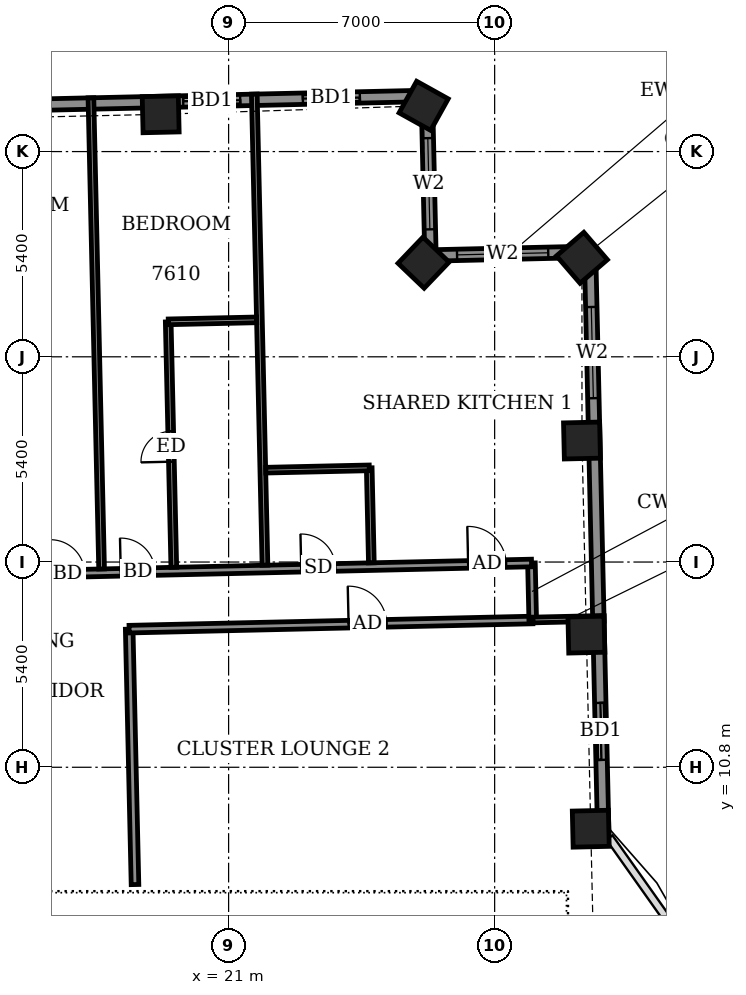
"""IFC4 building model, lengths in metres.
Left out: names, types, materials, properties, quantities, classifications, styles, units other than length and angle.
Written with IfcOpenShell. Run it as: python <this file> out.ifc"""

import sys

from ifc_helpers import new_model, si_unit, direction, frame, frame_2d, origin, origin_2d, place, context, subcontext, project, spatial, rectangle, extrude, element, fill, save


model = new_model("IFC4")
c1 = context("Model", 3, precision=1e-05, world=origin(), true_north=direction((0.0, 1.0)))
c2 = subcontext(c1, "Body", "Model", "MODEL_VIEW")
j1 = project(units=[si_unit("LENGTHUNIT", "METRE"), si_unit("PLANEANGLEUNIT", "RADIAN")], contexts=[c1])
p1 = place(None, origin())
s1 = spatial("IfcSite", under=j1, at=p1, CompositionType="ELEMENT")
p2 = place(p1, origin())
s2 = spatial("IfcBuilding", under=s1, at=p2, CompositionType="ELEMENT")
p3 = place(p2, frame((0.0, 0.0, 297.9)))
s3 = spatial("IfcBuildingStorey", under=s2, at=p3, CompositionType="ELEMENT", Elevation=297.9)
for number, where, z_axis, x_axis in (
    (1, (30.529, 9.183, -0.55), (0.0, 0.0, 1.0), (-0.023, 1.0, 0.0)),
    (2, (30.414, 14.29, -0.55), (0.0, 0.0, 1.0), (-0.023, 1.0, 0.0)),
    (3, (30.298, 19.397, -0.55), (0.0, 0.0, 1.0), (-0.023, 1.0, 0.0)),
    (4, (30.297, 24.205, -0.55), (0.0, 0.0, 1.0), (-0.652, 0.758, 0.0)),
    (5, (26.13, 24.077, -0.55), (0.0, 0.0, 1.0), (-0.723, 0.691, 0.0)),
    (6, (26.132, 28.204, -0.55), (0.0, 0.0, 1.0), (-0.874, 0.486, 0.0)),
    (7, (19.213, 27.981, -0.55), (0.0, 0.0, 1.0), (-1.0, -0.023, 0.0)),
):
    element("IfcColumn", number, at=place(p3, frame(where, z_axis=z_axis, x_axis=x_axis)), inside=s3, PredefinedType="COLUMN", context=c2, shape_type="SweptSolid", body=[
        extrude(rectangle(XDim=0.95, YDim=0.95, at=origin_2d()), origin(), (0.0, 0.0, 1.0), 3.6),
    ])
p4 = place(p3, frame((30.858, 9.032, 0.0), z_axis=(0.0, 0.0, 1.0), x_axis=(-0.022688132126, 0.999742591201, 0.0)))
e8 = element("IfcWall", 8, at=p4, inside=s3, PredefinedType="SOLIDWALL", context=c2, shape_type="SweptSolid", body=[
    extrude(rectangle(XDim=15.334, YDim=0.3, at=frame_2d((7.667, 0.0))), origin(), (0.0, 0.0, 1.0), 2.55),
])
p5 = place(p4, frame((1.963, 0.0, 0.0)))
e9 = element("IfcOpeningElement", 9, at=p5, cuts=e8, PredefinedType="OPENING", context=c2, shape_type="SweptSolid", body=[
    extrude(rectangle(XDim=1.5, YDim=2.4, at=frame_2d((0.75, 1.2))), frame((0.0, 0.16, 0.0), z_axis=(0.0, -1.0, 0.0), x_axis=(1.0, 0.0, 0.0)), (0.0, 0.0, 1.0), 0.32),
])
p6 = place(p4, frame((11.482, 0.0, 0.9)))
e10 = element("IfcOpeningElement", 10, at=p6, cuts=e8, PredefinedType="OPENING", context=c2, shape_type="SweptSolid", body=[
    extrude(rectangle(XDim=2.4, YDim=1.5, at=frame_2d((1.2, 0.75))), frame((0.0, 0.16, 0.0), z_axis=(0.0, -1.0, 0.0), x_axis=(1.0, 0.0, 0.0)), (0.0, 0.0, 1.0), 0.32),
])
p7 = place(p3, frame((30.51, 24.362, 0.0), z_axis=(0.0, 0.0, 1.0), x_axis=(-0.999739037152, -0.022844202663, 0.0)))
e11 = element("IfcWall", 11, at=p7, inside=s3, PredefinedType="SOLIDWALL", context=c2, shape_type="SweptSolid", body=[
    extrude(rectangle(XDim=4.2, YDim=0.3, at=frame_2d((2.1, 0.0))), origin(), (0.0, 0.0, 1.0), 2.55),
])
p8 = place(p7, frame((1.1, 0.0, 0.9)))
e12 = element("IfcOpeningElement", 12, at=p8, cuts=e11, PredefinedType="OPENING", context=c2, shape_type="SweptSolid", body=[
    extrude(rectangle(XDim=2.4, YDim=1.5, at=frame_2d((1.2, 0.75))), frame((0.0, 0.16, 0.0), z_axis=(0.0, -1.0, 0.0), x_axis=(1.0, 0.0, 0.0)), (0.0, 0.0, 1.0), 0.32),
])
p9 = place(p3, frame((26.311, 24.266, 0.0), z_axis=(0.0, 0.0, 1.0), x_axis=(-0.022611811187, 0.999744320311, 0.0)))
e13 = element("IfcWall", 13, at=p9, inside=s3, PredefinedType="SOLIDWALL", context=c2, shape_type="SweptSolid", body=[
    extrude(rectangle(XDim=4.2, YDim=0.3, at=frame_2d((2.1, 0.0))), origin(), (0.0, 0.0, 1.0), 2.55),
])
p10 = place(p9, frame((0.688, 0.0, 0.9)))
e14 = element("IfcOpeningElement", 14, at=p10, cuts=e13, PredefinedType="OPENING", context=c2, shape_type="SweptSolid", body=[
    extrude(rectangle(XDim=2.4, YDim=1.5, at=frame_2d((1.2, 0.75))), frame((0.0, 0.16, 0.0), z_axis=(0.0, -1.0, 0.0), x_axis=(1.0, 0.0, 0.0)), (0.0, 0.0, 1.0), 0.32),
])
p11 = place(p3, frame((26.216, 28.465, 0.0), z_axis=(0.0, 0.0, 1.0), x_axis=(-0.999742843677, -0.022677004157, 0.0)))
e15 = element("IfcWall", 15, at=p11, inside=s3, PredefinedType="SOLIDWALL", context=c2, shape_type="SweptSolid", body=[
    extrude(rectangle(XDim=49.836, YDim=0.3, at=frame_2d((24.918, 0.0))), origin(), (0.0, 0.0, 1.0), 2.5),
])
p12 = place(p11, frame((1.763, 0.0, 0.0)))
e16 = element("IfcOpeningElement", 16, at=p12, cuts=e15, PredefinedType="OPENING", context=c2, shape_type="SweptSolid", body=[
    extrude(rectangle(XDim=1.5, YDim=2.4, at=frame_2d((0.75, 1.2))), frame((0.0, 0.16, 0.0), z_axis=(0.0, -1.0, 0.0), x_axis=(1.0, 0.0, 0.0)), (0.0, 0.0, 1.0), 0.32),
])
p13 = place(p11, frame((4.912, 0.0, 0.0)))
e17 = element("IfcOpeningElement", 17, at=p13, cuts=e15, PredefinedType="OPENING", context=c2, shape_type="SweptSolid", body=[
    extrude(rectangle(XDim=1.5, YDim=2.4, at=frame_2d((0.75, 1.2))), frame((0.0, 0.16, 0.0), z_axis=(0.0, -1.0, 0.0), x_axis=(1.0, 0.0, 0.0)), (0.0, 0.0, 1.0), 0.32),
])
p14 = place(p11, frame((10.186, 0.0, 0.0)))
e18 = element("IfcOpeningElement", 18, at=p14, cuts=e15, PredefinedType="OPENING", context=c2, shape_type="SweptSolid", body=[
    extrude(rectangle(XDim=1.5, YDim=2.4, at=frame_2d((0.75, 1.2))), frame((0.0, 0.16, 0.0), z_axis=(0.0, -1.0, 0.0), x_axis=(1.0, 0.0, 0.0)), (0.0, 0.0, 1.0), 0.32),
])
p15 = place(p11, frame((15.093, 0.0, 0.0)))
e19 = element("IfcOpeningElement", 19, at=p15, cuts=e15, PredefinedType="OPENING", context=c2, shape_type="SweptSolid", body=[
    extrude(rectangle(XDim=1.5, YDim=2.4, at=frame_2d((0.75, 1.2))), frame((0.0, 0.16, 0.0), z_axis=(0.0, -1.0, 0.0), x_axis=(1.0, 0.0, 0.0)), (0.0, 0.0, 1.0), 0.32),
])
p16 = place(p11, frame((18.449, 0.0, 0.0)))
e20 = element("IfcOpeningElement", 20, at=p16, cuts=e15, PredefinedType="OPENING", context=c2, shape_type="SweptSolid", body=[
    extrude(rectangle(XDim=1.5, YDim=2.4, at=frame_2d((0.75, 1.2))), frame((0.0, 0.16, 0.0), z_axis=(0.0, -1.0, 0.0), x_axis=(1.0, 0.0, 0.0)), (0.0, 0.0, 1.0), 0.32),
])
p17 = place(p11, frame((22.924, 0.0, 0.0)))
e21 = element("IfcOpeningElement", 21, at=p17, cuts=e15, PredefinedType="OPENING", context=c2, shape_type="SweptSolid", body=[
    extrude(rectangle(XDim=1.5, YDim=2.4, at=frame_2d((0.75, 1.2))), frame((0.0, 0.16, 0.0), z_axis=(0.0, -1.0, 0.0), x_axis=(1.0, 0.0, 0.0)), (0.0, 0.0, 1.0), 0.32),
])
p18 = place(p11, frame((26.28, 0.0, 0.0)))
e22 = element("IfcOpeningElement", 22, at=p18, cuts=e15, PredefinedType="OPENING", context=c2, shape_type="SweptSolid", body=[
    extrude(rectangle(XDim=1.5, YDim=2.4, at=frame_2d((0.75, 1.2))), frame((0.0, 0.16, 0.0), z_axis=(0.0, -1.0, 0.0), x_axis=(1.0, 0.0, 0.0)), (0.0, 0.0, 1.0), 0.32),
])
p19 = place(p11, frame((31.361, 0.0, 0.0)))
e23 = element("IfcOpeningElement", 23, at=p19, cuts=e15, PredefinedType="OPENING", context=c2, shape_type="SweptSolid", body=[
    extrude(rectangle(XDim=1.5, YDim=2.4, at=frame_2d((0.75, 1.2))), frame((0.0, 0.16, 0.0), z_axis=(0.0, -1.0, 0.0), x_axis=(1.0, 0.0, 0.0)), (0.0, 0.0, 1.0), 0.32),
])
p20 = place(p11, frame((36.437, 0.0, 0.0)))
e24 = element("IfcOpeningElement", 24, at=p20, cuts=e15, PredefinedType="OPENING", context=c2, shape_type="SweptSolid", body=[
    extrude(rectangle(XDim=1.5, YDim=2.4, at=frame_2d((0.75, 1.2))), frame((0.0, 0.16, 0.0), z_axis=(0.0, -1.0, 0.0), x_axis=(1.0, 0.0, 0.0)), (0.0, 0.0, 1.0), 0.32),
])
p21 = place(p11, frame((39.793, 0.0, 0.0)))
e25 = element("IfcOpeningElement", 25, at=p21, cuts=e15, PredefinedType="OPENING", context=c2, shape_type="SweptSolid", body=[
    extrude(rectangle(XDim=1.5, YDim=2.4, at=frame_2d((0.75, 1.2))), frame((0.0, 0.16, 0.0), z_axis=(0.0, -1.0, 0.0), x_axis=(1.0, 0.0, 0.0)), (0.0, 0.0, 1.0), 0.32),
])
p22 = place(p11, frame((44.267, 0.0, 0.0)))
e26 = element("IfcOpeningElement", 26, at=p22, cuts=e15, PredefinedType="OPENING", context=c2, shape_type="SweptSolid", body=[
    extrude(rectangle(XDim=1.5, YDim=2.4, at=frame_2d((0.75, 1.2))), frame((0.0, 0.16, 0.0), z_axis=(0.0, -1.0, 0.0), x_axis=(1.0, 0.0, 0.0)), (0.0, 0.0, 1.0), 0.32),
])
p23 = place(p11, frame((47.524, 0.0, 0.9)))
e27 = element("IfcOpeningElement", 27, at=p23, cuts=e15, PredefinedType="OPENING", context=c2, shape_type="SweptSolid", body=[
    extrude(rectangle(XDim=1.2, YDim=1.5, at=frame_2d((0.6, 0.75))), frame((0.0, 0.16, 0.0), z_axis=(0.0, -1.0, 0.0), x_axis=(1.0, 0.0, 0.0)), (0.0, 0.0, 1.0), 0.32),
])
p24 = place(p3, frame((18.537, 7.714, 0.0), z_axis=(0.0, 0.0, 1.0), x_axis=(-0.022773383809, 0.999740652864, 0.0)))
e28 = element("IfcWall", 28, at=p24, inside=s3, PredefinedType="PARTITIONING", context=c2, shape_type="SweptSolid", body=[
    extrude(rectangle(XDim=6.722, YDim=0.2, at=frame_2d((3.361, 0.0))), origin(), (0.0, 0.0, 1.0), 3.05),
])
p25 = place(p3, frame((18.382, 14.434, 0.0), z_axis=(0.0, 0.0, 1.0), x_axis=(0.999742819156, 0.02267808514, 0.0)))
e29 = element("IfcWall", 29, at=p25, inside=s3, PredefinedType="PARTITIONING", context=c2, shape_type="SweptSolid", body=[
    extrude(rectangle(XDim=10.625, YDim=0.2, at=frame_2d((5.313, 0.0))), origin(), (0.0, 0.0, 1.0), 3.05),
])
p26 = place(p25, frame((5.777, 0.0, 0.0)))
e30 = element("IfcOpeningElement", 30, at=p26, cuts=e29, PredefinedType="OPENING", context=c2, shape_type="SweptSolid", body=[
    extrude(rectangle(XDim=1.0, YDim=2.1, at=frame_2d((0.5, 1.05))), frame((0.0, 0.11, 0.0), z_axis=(0.0, -1.0, 0.0), x_axis=(1.0, 0.0, 0.0)), (0.0, 0.0, 1.0), 0.22),
])
p27 = place(p3, frame((29.002, 14.675, 0.0), z_axis=(0.0, 0.0, 1.0), x_axis=(-0.022617910375, 0.999744182344, 0.0)))
e31 = element("IfcWall", 31, at=p27, inside=s3, PredefinedType="PARTITIONING", context=c2, shape_type="SweptSolid", body=[
    extrude(rectangle(XDim=1.5, YDim=0.2, at=frame_2d((0.75, 0.0))), origin(), (0.0, 0.0, 1.0), 3.05),
])
p28 = place(p3, frame((29.005, 14.675, 0.0), z_axis=(0.0, 0.0, 1.0), x_axis=(0.999737243051, 0.022922583999, 0.0)))
e32 = element("IfcWall", 32, at=p28, inside=s3, PredefinedType="PARTITIONING", context=c2, shape_type="SweptSolid", body=[
    extrude(rectangle(XDim=1.875, YDim=0.15, at=frame_2d((0.937, 0.0))), origin(), (0.0, 0.0, 1.0), 2.55),
])
p29 = place(p3, frame((-26.401, 14.918, 0.0), z_axis=(0.0, 0.0, 1.0), x_axis=(0.99974239733, 0.022696673341, 0.0)))
e33 = element("IfcWall", 33, at=p29, inside=s3, PredefinedType="PARTITIONING", context=c2, shape_type="SweptSolid", body=[
    extrude(rectangle(XDim=55.386, YDim=0.2, at=frame_2d((27.693, 0.0))), origin(), (0.0, 0.0, 1.0), 3.05),
])
p30 = place(p29, frame((53.718, 0.0, 0.0)))
e34 = element("IfcOpeningElement", 34, at=p30, cuts=e33, PredefinedType="OPENING", context=c2, shape_type="SweptSolid", body=[
    extrude(rectangle(XDim=1.0, YDim=2.1, at=frame_2d((0.5, 1.05))), frame((0.0, 0.11, 0.0), z_axis=(0.0, -1.0, 0.0), x_axis=(1.0, 0.0, 0.0)), (0.0, 0.0, 1.0), 0.22),
])
p31 = place(p29, frame((49.325, 0.0, 0.0)))
e35 = element("IfcOpeningElement", 35, at=p31, cuts=e33, PredefinedType="OPENING", context=c2, shape_type="SweptSolid", body=[
    extrude(rectangle(XDim=0.9, YDim=2.1, at=frame_2d((0.45, 1.05))), frame((0.0, 0.11, 0.0), z_axis=(0.0, -1.0, 0.0), x_axis=(1.0, 0.0, 0.0)), (0.0, 0.0, 1.0), 0.22),
])
p32 = place(p29, frame((44.575, 0.0, 0.0)))
e36 = element("IfcOpeningElement", 36, at=p32, cuts=e33, PredefinedType="OPENING", context=c2, shape_type="SweptSolid", body=[
    extrude(rectangle(XDim=0.9, YDim=2.1, at=frame_2d((0.45, 1.05))), frame((0.0, 0.11, 0.0), z_axis=(0.0, -1.0, 0.0), x_axis=(1.0, 0.0, 0.0)), (0.0, 0.0, 1.0), 0.22),
])
p33 = place(p29, frame((42.725, 0.0, 0.0)))
e37 = element("IfcOpeningElement", 37, at=p33, cuts=e33, PredefinedType="OPENING", context=c2, shape_type="SweptSolid", body=[
    extrude(rectangle(XDim=0.9, YDim=2.1, at=frame_2d((0.45, 1.05))), frame((0.0, 0.11, 0.0), z_axis=(0.0, -1.0, 0.0), x_axis=(1.0, 0.0, 0.0)), (0.0, 0.0, 1.0), 0.22),
])
p34 = place(p29, frame((36.1, 0.0, 0.0)))
e38 = element("IfcOpeningElement", 38, at=p34, cuts=e33, PredefinedType="OPENING", context=c2, shape_type="SweptSolid", body=[
    extrude(rectangle(XDim=0.9, YDim=2.1, at=frame_2d((0.45, 1.05))), frame((0.0, 0.11, 0.0), z_axis=(0.0, -1.0, 0.0), x_axis=(1.0, 0.0, 0.0)), (0.0, 0.0, 1.0), 0.22),
])
p35 = place(p29, frame((34.25, 0.0, 0.0)))
e39 = element("IfcOpeningElement", 39, at=p35, cuts=e33, PredefinedType="OPENING", context=c2, shape_type="SweptSolid", body=[
    extrude(rectangle(XDim=0.9, YDim=2.1, at=frame_2d((0.45, 1.05))), frame((0.0, 0.11, 0.0), z_axis=(0.0, -1.0, 0.0), x_axis=(1.0, 0.0, 0.0)), (0.0, 0.0, 1.0), 0.22),
])
p36 = place(p29, frame((27.6, 0.0, 0.0)))
e40 = element("IfcOpeningElement", 40, at=p36, cuts=e33, PredefinedType="OPENING", context=c2, shape_type="SweptSolid", body=[
    extrude(rectangle(XDim=0.9, YDim=2.1, at=frame_2d((0.45, 1.05))), frame((0.0, 0.11, 0.0), z_axis=(0.0, -1.0, 0.0), x_axis=(1.0, 0.0, 0.0)), (0.0, 0.0, 1.0), 0.22),
])
p37 = place(p29, frame((25.775, 0.0, 0.0)))
e41 = element("IfcOpeningElement", 41, at=p37, cuts=e33, PredefinedType="OPENING", context=c2, shape_type="SweptSolid", body=[
    extrude(rectangle(XDim=0.9, YDim=2.1, at=frame_2d((0.45, 1.05))), frame((0.0, 0.11, 0.0), z_axis=(0.0, -1.0, 0.0), x_axis=(1.0, 0.0, 0.0)), (0.0, 0.0, 1.0), 0.22),
])
p38 = place(p29, frame((19.15, 0.0, 0.0)))
e42 = element("IfcOpeningElement", 42, at=p38, cuts=e33, PredefinedType="OPENING", context=c2, shape_type="SweptSolid", body=[
    extrude(rectangle(XDim=0.9, YDim=2.1, at=frame_2d((0.45, 1.05))), frame((0.0, 0.11, 0.0), z_axis=(0.0, -1.0, 0.0), x_axis=(1.0, 0.0, 0.0)), (0.0, 0.0, 1.0), 0.22),
])
p39 = place(p29, frame((17.3, 0.0, 0.0)))
e43 = element("IfcOpeningElement", 43, at=p39, cuts=e33, PredefinedType="OPENING", context=c2, shape_type="SweptSolid", body=[
    extrude(rectangle(XDim=0.9, YDim=2.1, at=frame_2d((0.45, 1.05))), frame((0.0, 0.11, 0.0), z_axis=(0.0, -1.0, 0.0), x_axis=(1.0, 0.0, 0.0)), (0.0, 0.0, 1.0), 0.22),
])
p40 = place(p29, frame((10.65, 0.0, 0.0)))
e44 = element("IfcOpeningElement", 44, at=p40, cuts=e33, PredefinedType="OPENING", context=c2, shape_type="SweptSolid", body=[
    extrude(rectangle(XDim=0.9, YDim=2.1, at=frame_2d((0.45, 1.05))), frame((0.0, 0.11, 0.0), z_axis=(0.0, -1.0, 0.0), x_axis=(1.0, 0.0, 0.0)), (0.0, 0.0, 1.0), 0.22),
])
p41 = place(p29, frame((8.8, 0.0, 0.0)))
e45 = element("IfcOpeningElement", 45, at=p41, cuts=e33, PredefinedType="OPENING", context=c2, shape_type="SweptSolid", body=[
    extrude(rectangle(XDim=0.9, YDim=2.1, at=frame_2d((0.45, 1.05))), frame((0.0, 0.11, 0.0), z_axis=(0.0, -1.0, 0.0), x_axis=(1.0, 0.0, 0.0)), (0.0, 0.0, 1.0), 0.22),
])
p42 = place(p29, frame((1.864, 0.0, 0.0)))
e46 = element("IfcOpeningElement", 46, at=p42, cuts=e33, PredefinedType="OPENING", context=c2, shape_type="SweptSolid", body=[
    extrude(rectangle(XDim=1.0, YDim=2.1, at=frame_2d((0.5, 1.05))), frame((0.0, 0.11, 0.0), z_axis=(0.0, -1.0, 0.0), x_axis=(1.0, 0.0, 0.0)), (0.0, 0.0, 1.0), 0.22),
])
p43 = place(p3, frame((17.658, 16.018, 0.0), z_axis=(0.0, 0.0, 1.0), x_axis=(-0.022661475803, 0.999743195783, 0.0)))
e47 = element("IfcWall", 47, at=p43, inside=s3, PredefinedType="PARTITIONING", context=c2, shape_type="SweptSolid", body=[
    extrude(rectangle(XDim=12.4, YDim=0.15, at=frame_2d((6.2, 0.0))), origin(), (0.0, 0.0, 1.0), 2.5),
])
p44 = place(p3, frame((19.558, 16.061, 0.0), z_axis=(0.0, 0.0, 1.0), x_axis=(-0.022790087107, 0.999740272236, 0.0)))
e48 = element("IfcWall", 48, at=p44, inside=s3, PredefinedType="PARTITIONING", context=c2, shape_type="SweptSolid", body=[
    extrude(rectangle(XDim=6.46, YDim=0.15, at=frame_2d((3.23, 0.0))), origin(), (0.0, 0.0, 1.0), 3.05),
])
p45 = place(p44, frame((2.78, 0.0, 0.0)))
e49 = element("IfcOpeningElement", 49, at=p45, cuts=e48, PredefinedType="OPENING", context=c2, shape_type="SweptSolid", body=[
    extrude(rectangle(XDim=0.8, YDim=2.1, at=frame_2d((0.4, 1.05))), frame((0.0, 0.085, 0.0), z_axis=(0.0, -1.0, 0.0), x_axis=(1.0, 0.0, 0.0)), (0.0, 0.0, 1.0), 0.17),
])
p46 = place(p3, frame((21.957, 16.116, 0.0), z_axis=(0.0, 0.0, 1.0), x_axis=(-0.022663260168, 0.999743155335, 0.0)))
e50 = element("IfcWall", 50, at=p46, inside=s3, PredefinedType="PARTITIONING", context=c2, shape_type="SweptSolid", body=[
    extrude(rectangle(XDim=12.399, YDim=0.15, at=frame_2d((6.2, 0.0))), origin(), (0.0, 0.0, 1.0), 2.55),
])
p47 = place(p3, frame((24.756, 16.179, 0.0), z_axis=(0.0, 0.0, 1.0), x_axis=(-0.022464044534, 0.999747651512, 0.0)))
e51 = element("IfcWall", 51, at=p47, inside=s3, PredefinedType="PARTITIONING", context=c2, shape_type="SweptSolid", body=[
    extrude(rectangle(XDim=2.5, YDim=0.15, at=frame_2d((1.25, 0.0))), origin(), (0.0, 0.0, 1.0), 3.05),
])
p48 = place(p3, frame((21.977, 18.617, 0.0), z_axis=(0.0, 0.0, 1.0), x_axis=(0.999749227207, 0.022393809408, 0.0)))
e52 = element("IfcWall", 52, at=p48, inside=s3, PredefinedType="PARTITIONING", context=c2, shape_type="SweptSolid", body=[
    extrude(rectangle(XDim=2.726, YDim=0.15, at=frame_2d((1.363, 0.0))), origin(), (0.0, 0.0, 1.0), 3.05),
])
p49 = place(p3, frame((19.413, 22.52, 0.0), z_axis=(0.0, 0.0, 1.0), x_axis=(0.999749954681, 0.022361308448, 0.0)))
e53 = element("IfcWall", 53, at=p49, inside=s3, PredefinedType="PARTITIONING", context=c2, shape_type="SweptSolid", body=[
    extrude(rectangle(XDim=2.325, YDim=0.15, at=frame_2d((1.163, 0.0))), origin(), (0.0, 0.0, 1.0), 3.05),
])
p50 = place(p5, origin())
e54 = element("IfcDoor", 54, at=p50, inside=s3, OperationType="SLIDING_TO_LEFT", PredefinedType="DOOR", context=c2, shape_type="SweptSolid", body=[
    extrude(rectangle(XDim=1.5, YDim=2.4, at=frame_2d((0.75, 1.2))), frame((0.0, 0.025, 0.0), z_axis=(0.0, -1.0, 0.0), x_axis=(1.0, 0.0, 0.0)), (0.0, 0.0, 1.0), 0.05),
])
fill(e9, e54)
p51 = place(p6, origin())
e55 = element("IfcWindow", 55, at=p51, inside=s3, PartitioningType="DOUBLE_PANEL_VERTICAL", PredefinedType="WINDOW", context=c2, shape_type="SweptSolid", body=[
    extrude(rectangle(XDim=2.4, YDim=1.5, at=frame_2d((1.2, 0.75))), frame((0.0, 0.03, 0.0), z_axis=(0.0, -1.0, 0.0), x_axis=(1.0, 0.0, 0.0)), (0.0, 0.0, 1.0), 0.06),
])
fill(e10, e55)
p52 = place(p8, origin())
e56 = element("IfcWindow", 56, at=p52, inside=s3, PartitioningType="DOUBLE_PANEL_VERTICAL", PredefinedType="WINDOW", context=c2, shape_type="SweptSolid", body=[
    extrude(rectangle(XDim=2.4, YDim=1.5, at=frame_2d((1.2, 0.75))), frame((0.0, 0.03, 0.0), z_axis=(0.0, -1.0, 0.0), x_axis=(1.0, 0.0, 0.0)), (0.0, 0.0, 1.0), 0.06),
])
fill(e12, e56)
p53 = place(p10, origin())
e57 = element("IfcWindow", 57, at=p53, inside=s3, PartitioningType="DOUBLE_PANEL_VERTICAL", PredefinedType="WINDOW", context=c2, shape_type="SweptSolid", body=[
    extrude(rectangle(XDim=2.4, YDim=1.5, at=frame_2d((1.2, 0.75))), frame((0.0, 0.03, 0.0), z_axis=(0.0, -1.0, 0.0), x_axis=(1.0, 0.0, 0.0)), (0.0, 0.0, 1.0), 0.06),
])
fill(e14, e57)
p54 = place(p12, origin())
e58 = element("IfcDoor", 58, at=p54, inside=s3, OperationType="SLIDING_TO_LEFT", PredefinedType="DOOR", context=c2, shape_type="SweptSolid", body=[
    extrude(rectangle(XDim=1.5, YDim=2.4, at=frame_2d((0.75, 1.2))), frame((0.0, 0.025, 0.0), z_axis=(0.0, -1.0, 0.0), x_axis=(1.0, 0.0, 0.0)), (0.0, 0.0, 1.0), 0.05),
])
fill(e16, e58)
p55 = place(p13, origin())
e59 = element("IfcDoor", 59, at=p55, inside=s3, OperationType="SLIDING_TO_LEFT", PredefinedType="DOOR", context=c2, shape_type="SweptSolid", body=[
    extrude(rectangle(XDim=1.5, YDim=2.4, at=frame_2d((0.75, 1.2))), frame((0.0, 0.025, 0.0), z_axis=(0.0, -1.0, 0.0), x_axis=(1.0, 0.0, 0.0)), (0.0, 0.0, 1.0), 0.05),
])
fill(e17, e59)
p56 = place(p26, origin())
e60 = element("IfcDoor", 60, at=p56, inside=s3, OperationType="SINGLE_SWING_RIGHT", PredefinedType="DOOR", context=c2, shape_type="SweptSolid", body=[
    extrude(rectangle(XDim=1.0, YDim=2.1, at=frame_2d((0.5, 1.05))), frame((0.0, 0.025, 0.0), z_axis=(0.0, -1.0, 0.0), x_axis=(1.0, 0.0, 0.0)), (0.0, 0.0, 1.0), 0.05),
])
fill(e30, e60)
p57 = place(p30, origin())
e61 = element("IfcDoor", 61, at=p57, inside=s3, OperationType="SINGLE_SWING_LEFT", PredefinedType="DOOR", context=c2, shape_type="SweptSolid", body=[
    extrude(rectangle(XDim=1.0, YDim=2.1, at=frame_2d((0.5, 1.05))), frame((0.0, 0.025, 0.0), z_axis=(0.0, -1.0, 0.0), x_axis=(1.0, 0.0, 0.0)), (0.0, 0.0, 1.0), 0.05),
])
fill(e34, e61)
p58 = place(p31, origin())
e62 = element("IfcDoor", 62, at=p58, inside=s3, OperationType="SINGLE_SWING_RIGHT", PredefinedType="DOOR", context=c2, shape_type="SweptSolid", body=[
    extrude(rectangle(XDim=0.9, YDim=2.1, at=frame_2d((0.45, 1.05))), frame((0.0, 0.025, 0.0), z_axis=(0.0, -1.0, 0.0), x_axis=(1.0, 0.0, 0.0)), (0.0, 0.0, 1.0), 0.05),
])
fill(e35, e62)
p59 = place(p32, origin())
e63 = element("IfcDoor", 63, at=p59, inside=s3, OperationType="SINGLE_SWING_RIGHT", PredefinedType="DOOR", context=c2, shape_type="SweptSolid", body=[
    extrude(rectangle(XDim=0.9, YDim=2.1, at=frame_2d((0.45, 1.05))), frame((0.0, 0.025, 0.0), z_axis=(0.0, -1.0, 0.0), x_axis=(1.0, 0.0, 0.0)), (0.0, 0.0, 1.0), 0.05),
])
fill(e36, e63)
p60 = place(p45, origin())
e64 = element("IfcDoor", 64, at=p60, inside=s3, OperationType="SINGLE_SWING_RIGHT", PredefinedType="DOOR", context=c2, shape_type="SweptSolid", body=[
    extrude(rectangle(XDim=0.8, YDim=2.1, at=frame_2d((0.4, 1.05))), frame((0.0, 0.025, 0.0), z_axis=(0.0, -1.0, 0.0), x_axis=(1.0, 0.0, 0.0)), (0.0, 0.0, 1.0), 0.05),
])
fill(e49, e64)
p61 = place(p33, origin())
e65 = element("IfcDoor", 65, at=p61, inside=s3, OperationType="SINGLE_SWING_LEFT", PredefinedType="DOOR", context=c2, shape_type="SweptSolid", body=[
    extrude(rectangle(XDim=0.9, YDim=2.1, at=frame_2d((0.45, 1.05))), frame((0.0, 0.025, 0.0), z_axis=(0.0, -1.0, 0.0), x_axis=(1.0, 0.0, 0.0)), (0.0, 0.0, 1.0), 0.05),
])
fill(e37, e65)
save(model, sys.argv[1])
